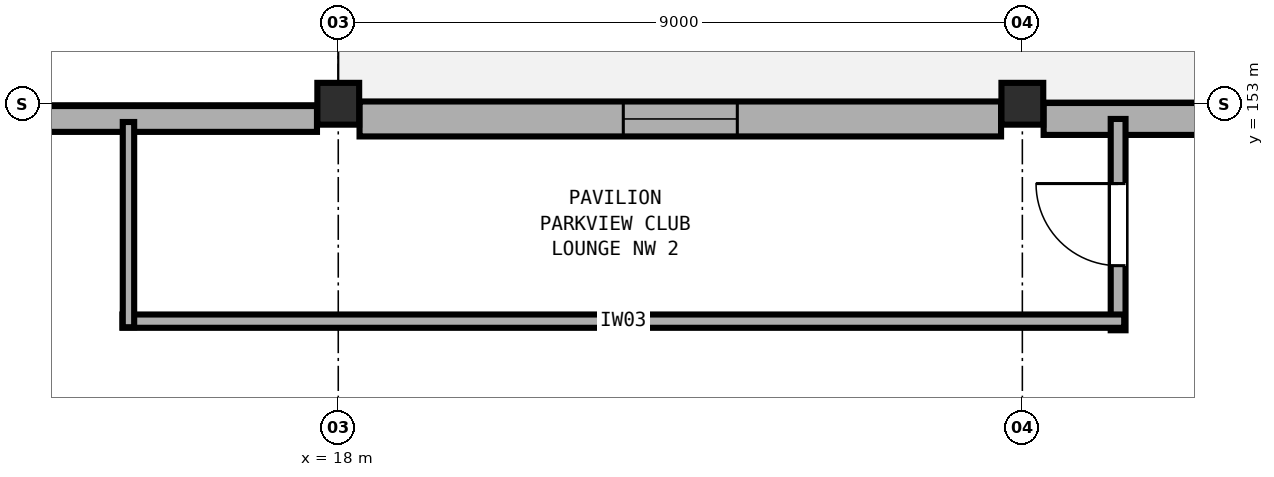
"""IFC4 building model, lengths in metres.
Left out: names, types, materials, properties, quantities, classifications, styles, units other than length and angle.
Written with IfcOpenShell. Run it as: python <this file> out.ifc"""

import sys

from ifc_helpers import new_model, si_unit, direction, frame, frame_2d, origin, origin_2d, place, context, subcontext, project, spatial, rectangle, extrude, element, fill, save


model = new_model("IFC4")
c1 = context("Model", 3, precision=1e-05, world=origin(), true_north=direction((0.0, 1.0)))
c2 = subcontext(c1, "Body", "Model", "MODEL_VIEW")
j1 = project(units=[si_unit("LENGTHUNIT", "METRE"), si_unit("PLANEANGLEUNIT", "RADIAN")], contexts=[c1])
p1 = place(None, origin())
s1 = spatial("IfcSite", under=j1, at=p1, CompositionType="ELEMENT")
p2 = place(p1, origin())
s2 = spatial("IfcBuilding", under=s1, at=p2, CompositionType="ELEMENT")
p3 = place(p2, frame((0.0, 0.0, 9.6)))
s3 = spatial("IfcBuildingStorey", under=s2, at=p3, CompositionType="ELEMENT", Elevation=9.6)
for number, where, z_axis, x_axis in (
    (1, (18.0, 153.0, 0.0), (0.0, 0.0, 1.0), (1.0, 0.0, 0.0)),
    (2, (27.0, 153.0, 0.0), (0.0, 0.0, 1.0), (1.0, 0.0, 0.0)),
):
    element("IfcColumn", number, at=place(p3, frame(where, z_axis=z_axis, x_axis=x_axis)), inside=s3, PredefinedType="COLUMN", context=c2, shape_type="SweptSolid", body=[
        extrude(rectangle(XDim=0.55, YDim=0.55, at=origin_2d()), origin(), (0.0, 0.0, 1.0), 4.8),
    ])
p4 = place(p3, frame((9.28, 152.8, 0.0), z_axis=(0.0, 0.0, 1.0), x_axis=(1.0, 0.0, 0.0)))
e3 = element("IfcWall", 3, at=p4, inside=s3, PredefinedType="SOLIDWALL", context=c2, shape_type="SweptSolid", body=[
    extrude(rectangle(XDim=8.44, YDim=0.34, at=frame_2d((4.22, 0.0))), origin(), (0.0, 0.0, 1.0), 3.58),
])
p5 = place(p4, frame((3.52, 0.0, 0.9)))
e4 = element("IfcOpeningElement", 4, at=p5, cuts=e3, PredefinedType="OPENING", context=c2, shape_type="SweptSolid", body=[
    extrude(rectangle(XDim=1.4, YDim=1.55, at=frame_2d((0.7, 0.775))), frame((0.0, 0.18, 0.0), z_axis=(0.0, -1.0, 0.0), x_axis=(1.0, 0.0, 0.0)), (0.0, 0.0, 1.0), 0.36),
])
p6 = place(p3, frame((18.28, 152.8, 0.0), z_axis=(0.0, 0.0, 1.0), x_axis=(1.0, 0.0, 0.0)))
e5 = element("IfcWall", 5, at=p6, inside=s3, PredefinedType="SOLIDWALL", context=c2, shape_type="SweptSolid", body=[
    extrude(rectangle(XDim=8.44, YDim=0.46, at=frame_2d((4.22, 0.0))), origin(), (0.0, 0.0, 1.0), 3.58),
])
p7 = place(p6, frame((3.47, 0.0, 0.9)))
e6 = element("IfcOpeningElement", 6, at=p7, cuts=e5, PredefinedType="OPENING", context=c2, shape_type="SweptSolid", body=[
    extrude(rectangle(XDim=1.5, YDim=1.6, at=frame_2d((0.75, 0.8))), frame((0.0, 0.24, 0.0), z_axis=(0.0, -1.0, 0.0), x_axis=(1.0, 0.0, 0.0)), (0.0, 0.0, 1.0), 0.48),
])
p8 = place(p3, frame((27.28, 152.8, 0.0), z_axis=(0.0, 0.0, 1.0), x_axis=(1.0, 0.0, 0.0)))
e7 = element("IfcWall", 7, at=p8, inside=s3, PredefinedType="SOLIDWALL", context=c2, shape_type="SweptSolid", body=[
    extrude(rectangle(XDim=8.44, YDim=0.42, at=frame_2d((4.22, 0.0))), origin(), (0.0, 0.0, 1.0), 3.58),
])
p9 = place(p8, frame((3.42, 0.0, 0.9)))
e8 = element("IfcOpeningElement", 8, at=p9, cuts=e7, PredefinedType="OPENING", context=c2, shape_type="SweptSolid", body=[
    extrude(rectangle(XDim=1.6, YDim=1.65, at=frame_2d((0.8, 0.825))), frame((0.0, 0.22, 0.0), z_axis=(0.0, -1.0, 0.0), x_axis=(1.0, 0.0, 0.0)), (0.0, 0.0, 1.0), 0.44),
])
p10 = place(p3, frame((28.26, 150.02, 0.0), z_axis=(0.0, 0.0, 1.0), x_axis=(0.0, 1.0, 0.0)))
e9 = element("IfcWall", 9, at=p10, inside=s3, PredefinedType="PARTITIONING", context=c2, shape_type="SweptSolid", body=[
    extrude(rectangle(XDim=2.78, YDim=0.195, at=frame_2d((1.39, 0.0))), origin(), (0.0, 0.0, 1.0), 3.56),
])
p11 = place(p10, frame((0.85, 0.0, 0.0)))
e10 = element("IfcOpeningElement", 10, at=p11, cuts=e9, PredefinedType="OPENING", context=c2, shape_type="SweptSolid", body=[
    extrude(rectangle(XDim=1.08, YDim=2.18, at=frame_2d((0.54, 1.09))), frame((0.0, 0.107, 0.0), z_axis=(0.0, -1.0, 0.0), x_axis=(1.0, 0.0, 0.0)), (0.0, 0.0, 1.0), 0.215),
])
p12 = place(p3, frame((28.34, 150.14, 0.0), z_axis=(0.0, 0.0, 1.0), x_axis=(-1.0, 0.0, 0.0)))
e11 = element("IfcWall", 11, at=p12, inside=s3, PredefinedType="PARTITIONING", context=c2, shape_type="SweptSolid", body=[
    extrude(rectangle(XDim=13.18, YDim=0.175, at=frame_2d((6.59, 0.0))), origin(), (0.0, 0.0, 1.0), 3.56),
])
p13 = place(p3, frame((15.24, 150.06, 0.0), z_axis=(0.0, 0.0, 1.0), x_axis=(0.0, 1.0, 0.0)))
e12 = element("IfcWall", 12, at=p13, inside=s3, PredefinedType="PARTITIONING", context=c2, shape_type="SweptSolid", body=[
    extrude(rectangle(XDim=2.7, YDim=0.15, at=frame_2d((1.35, 0.0))), origin(), (0.0, 0.0, 1.0), 3.56),
])
p14 = place(p7, origin())
e13 = element("IfcWindow", 13, at=p14, inside=s3, PartitioningType="SINGLE_PANEL", PredefinedType="WINDOW", context=c2, shape_type="SweptSolid", body=[
    extrude(rectangle(XDim=1.5, YDim=1.6, at=frame_2d((0.75, 0.8))), frame((0.0, 0.03, 0.0), z_axis=(0.0, -1.0, 0.0), x_axis=(1.0, 0.0, 0.0)), (0.0, 0.0, 1.0), 0.06),
])
fill(e6, e13)
p15 = place(p11, origin())
e14 = element("IfcDoor", 14, at=p15, inside=s3, OperationType="SINGLE_SWING_RIGHT", PredefinedType="DOOR", context=c2, shape_type="SweptSolid", body=[
    extrude(rectangle(XDim=1.08, YDim=2.18, at=frame_2d((0.54, 1.09))), frame((0.0, 0.025, 0.0), z_axis=(0.0, -1.0, 0.0), x_axis=(1.0, 0.0, 0.0)), (0.0, 0.0, 1.0), 0.05),
])
fill(e10, e14)
save(model, sys.argv[1])
